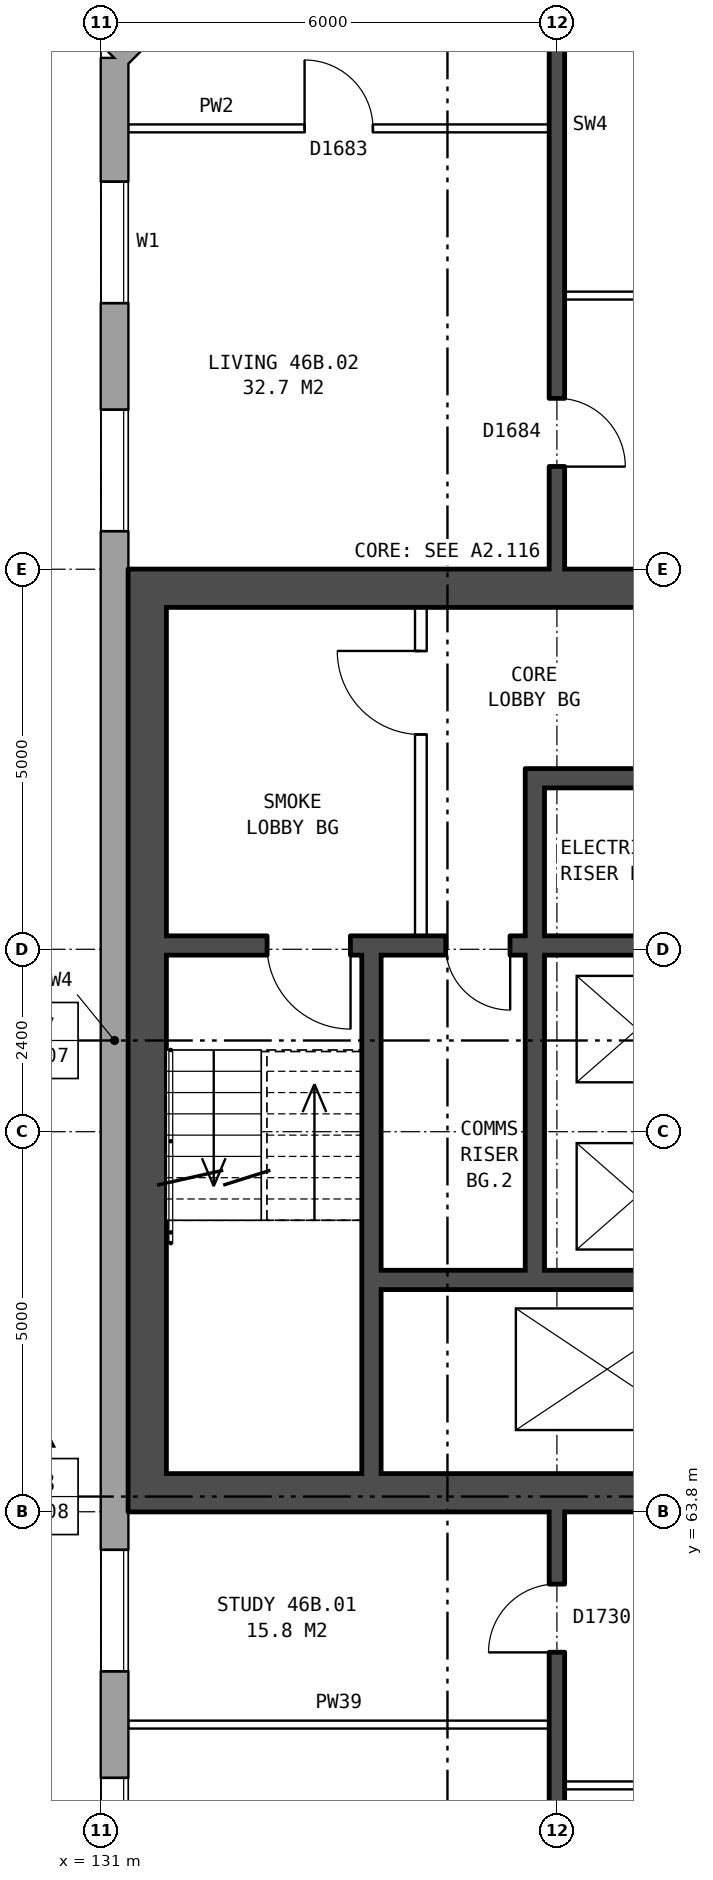
"""IFC4 building model, lengths in metres.
Left out: names, types, materials, properties, quantities, classifications, styles, units other than length and angle.
Written with IfcOpenShell. Run it as: python <this file> out.ifc"""

import sys

from ifc_helpers import new_model, si_unit, direction, frame, frame_2d, origin, place, context, subcontext, project, spatial, rectangle, extrude, element, fill, save


model = new_model("IFC4")
c1 = context("Model", 3, precision=1e-05, world=origin(), true_north=direction((0.0, 1.0)))
c2 = subcontext(c1, "Body", "Model", "MODEL_VIEW")
j1 = project(units=[si_unit("LENGTHUNIT", "METRE"), si_unit("PLANEANGLEUNIT", "RADIAN")], contexts=[c1])
p1 = place(None, origin())
s1 = spatial("IfcSite", under=j1, at=p1, CompositionType="ELEMENT")
p2 = place(p1, origin())
s2 = spatial("IfcBuilding", under=s1, at=p2, CompositionType="ELEMENT")
p3 = place(p2, frame((0.0, 0.0, 164.0)))
s3 = spatial("IfcBuildingStorey", under=s2, at=p3, CompositionType="ELEMENT", Elevation=164.0)
p4 = place(p3, frame((134.075, 85.82, 0.0), z_axis=(0.0, 0.0, 1.0), x_axis=(-0.707106781187, -0.707106781187, 0.0)))
e1 = element("IfcWall", 1, at=p4, inside=s3, PredefinedType="STANDARD", context=c2, shape_type="SweptSolid", body=[
    extrude(rectangle(XDim=4.094, YDim=0.36, at=frame_2d((2.047, 0.0))), origin(), (0.0, 0.0, 1.0), 2.85),
])
p5 = place(p4, frame((1.247, 0.0, 0.8)))
e2 = element("IfcOpeningElement", 2, at=p5, cuts=e1, PredefinedType="OPENING", context=c2, shape_type="SweptSolid", body=[
    extrude(rectangle(XDim=1.6, YDim=1.8, at=frame_2d((0.8, 0.9))), frame((0.0, 0.19, 0.0), z_axis=(0.0, -1.0, 0.0), x_axis=(1.0, 0.0, 0.0)), (0.0, 0.0, 1.0), 0.38),
])
p6 = place(p3, frame((131.18, 82.925, 0.0), z_axis=(0.0, 0.0, 1.0), x_axis=(0.0, -1.0, 0.0)))
e3 = element("IfcWall", 3, at=p6, inside=s3, PredefinedType="STANDARD", context=c2, shape_type="SweptSolid", body=[
    extrude(rectangle(XDim=25.851, YDim=0.36, at=frame_2d((12.925, 0.0))), origin(), (0.0, 0.0, 1.0), 2.85),
])
p7 = place(p6, frame((1.625, 0.0, 0.8)))
e4 = element("IfcOpeningElement", 4, at=p7, cuts=e3, PredefinedType="OPENING", context=c2, shape_type="SweptSolid", body=[
    extrude(rectangle(XDim=1.6, YDim=1.8, at=frame_2d((0.8, 0.9))), frame((0.0, 0.19, 0.0), z_axis=(0.0, -1.0, 0.0), x_axis=(1.0, 0.0, 0.0)), (0.0, 0.0, 1.0), 0.38),
])
p8 = place(p6, frame((4.625, 0.0, 0.8)))
e5 = element("IfcOpeningElement", 5, at=p8, cuts=e3, PredefinedType="OPENING", context=c2, shape_type="SweptSolid", body=[
    extrude(rectangle(XDim=1.6, YDim=1.8, at=frame_2d((0.8, 0.9))), frame((0.0, 0.19, 0.0), z_axis=(0.0, -1.0, 0.0), x_axis=(1.0, 0.0, 0.0)), (0.0, 0.0, 1.0), 0.38),
])
p9 = place(p6, frame((19.625, 0.0, 0.8)))
e6 = element("IfcOpeningElement", 6, at=p9, cuts=e3, PredefinedType="OPENING", context=c2, shape_type="SweptSolid", body=[
    extrude(rectangle(XDim=1.6, YDim=1.8, at=frame_2d((0.8, 0.9))), frame((0.0, 0.19, 0.0), z_axis=(0.0, -1.0, 0.0), x_axis=(1.0, 0.0, 0.0)), (0.0, 0.0, 1.0), 0.38),
])
p10 = place(p6, frame((22.625, 0.0, 0.8)))
e7 = element("IfcOpeningElement", 7, at=p10, cuts=e3, PredefinedType="OPENING", context=c2, shape_type="SweptSolid", body=[
    extrude(rectangle(XDim=1.6, YDim=1.8, at=frame_2d((0.8, 0.9))), frame((0.0, 0.19, 0.0), z_axis=(0.0, -1.0, 0.0), x_axis=(1.0, 0.0, 0.0)), (0.0, 0.0, 1.0), 0.38),
])
p11 = place(p3, frame((131.61, 63.8, 0.0), z_axis=(0.0, 0.0, 1.0), x_axis=(0.0, 1.0, 0.0)))
e8 = element("IfcWall", 8, at=p11, inside=s3, PredefinedType="SHEAR", context=c2, shape_type="SweptSolid", body=[
    extrude(rectangle(XDim=12.4, YDim=0.5, at=frame_2d((6.2, 0.0))), origin(), (0.0, 0.0, 1.0), 2.85),
])
for number, where, z_axis, x_axis in (
    (9, (139.26, 64.05, 0.0), (0.0, 0.0, 1.0), (-1.0, 0.0, 0.0)),
    (10, (139.26, 75.95, 0.0), (0.0, 0.0, 1.0), (-1.0, 0.0, 0.0)),
):
    element("IfcWall", number, at=place(p3, frame(where, z_axis=z_axis, x_axis=x_axis)), inside=s3, PredefinedType="SHEAR", context=c2, shape_type="SweptSolid", body=[
        extrude(rectangle(XDim=7.4, YDim=0.5, at=frame_2d((3.7, 0.0))), origin(), (0.0, 0.0, 1.0), 2.85),
    ])
p12 = place(p3, frame((139.26, 66.85, 0.0), z_axis=(0.0, 0.0, 1.0), x_axis=(-1.0, 0.0, 0.0)))
e11 = element("IfcWall", 11, at=p12, inside=s3, PredefinedType="SHEAR", context=c2, shape_type="SweptSolid", body=[
    extrude(rectangle(XDim=4.575, YDim=0.25, at=frame_2d((2.288, 0.0))), origin(), (0.0, 0.0, 1.0), 2.85),
])
p13 = place(p3, frame((139.26, 71.25, 0.0), z_axis=(0.0, 0.0, 1.0), x_axis=(-1.0, 0.0, 0.0)))
e12 = element("IfcWall", 12, at=p13, inside=s3, PredefinedType="SHEAR", context=c2, shape_type="SweptSolid", body=[
    extrude(rectangle(XDim=7.4, YDim=0.25, at=frame_2d((3.7, 0.0))), origin(), (0.0, 0.0, 1.0), 2.85),
])
p14 = place(p13, frame((4.975, 0.0, 0.0)))
e13 = element("IfcOpeningElement", 13, at=p14, cuts=e12, PredefinedType="OPENING", context=c2, shape_type="SweptSolid", body=[
    extrude(rectangle(XDim=1.1, YDim=2.1, at=frame_2d((0.55, 1.05))), frame((0.0, 0.135, 0.0), z_axis=(0.0, -1.0, 0.0), x_axis=(1.0, 0.0, 0.0)), (0.0, 0.0, 1.0), 0.27),
])
p15 = place(p13, frame((2.875, 0.0, 0.0)))
e14 = element("IfcOpeningElement", 14, at=p15, cuts=e12, PredefinedType="OPENING", context=c2, shape_type="SweptSolid", body=[
    extrude(rectangle(XDim=0.85, YDim=2.1, at=frame_2d((0.425, 1.05))), frame((0.0, 0.135, 0.0), z_axis=(0.0, -1.0, 0.0), x_axis=(1.0, 0.0, 0.0)), (0.0, 0.0, 1.0), 0.27),
])
p16 = place(p3, frame((139.26, 73.45, 0.0), z_axis=(0.0, 0.0, 1.0), x_axis=(-1.0, 0.0, 0.0)))
e15 = element("IfcWall", 15, at=p16, inside=s3, PredefinedType="SHEAR", context=c2, shape_type="SweptSolid", body=[
    extrude(rectangle(XDim=2.425, YDim=0.25, at=frame_2d((1.212, 0.0))), origin(), (0.0, 0.0, 1.0), 2.85),
])
p17 = place(p3, frame((136.71, 66.975, 0.0), z_axis=(0.0, 0.0, 1.0), x_axis=(0.0, 1.0, 0.0)))
e16 = element("IfcWall", 16, at=p17, inside=s3, PredefinedType="SHEAR", context=c2, shape_type="SweptSolid", body=[
    extrude(rectangle(XDim=4.15, YDim=0.25, at=frame_2d((2.075, 0.0))), origin(), (0.0, 0.0, 1.0), 2.85),
])
p18 = place(p3, frame((136.71, 71.375, 0.0), z_axis=(0.0, 0.0, 1.0), x_axis=(0.0, 1.0, 0.0)))
e17 = element("IfcWall", 17, at=p18, inside=s3, PredefinedType="SHEAR", context=c2, shape_type="SweptSolid", body=[
    extrude(rectangle(XDim=2.2, YDim=0.25, at=frame_2d((1.1, 0.0))), origin(), (0.0, 0.0, 1.0), 2.85),
])
p19 = place(p3, frame((135.21, 71.375, 0.0), z_axis=(0.0, 0.0, 1.0), x_axis=(0.0, 1.0, 0.0)))
e18 = element("IfcWall", 18, at=p19, inside=s3, PredefinedType="PARTITIONING", context=c2, shape_type="SweptSolid", body=[
    extrude(rectangle(XDim=4.325, YDim=0.15, at=frame_2d((2.163, 0.0))), origin(), (0.0, 0.0, 1.0), 2.85),
])
p20 = place(p19, frame((2.65, 0.0, 0.0)))
e19 = element("IfcOpeningElement", 19, at=p20, cuts=e18, PredefinedType="OPENING", context=c2, shape_type="SweptSolid", body=[
    extrude(rectangle(XDim=1.1, YDim=2.1, at=frame_2d((0.55, 1.05))), frame((0.0, 0.085, 0.0), z_axis=(0.0, -1.0, 0.0), x_axis=(1.0, 0.0, 0.0)), (0.0, 0.0, 1.0), 0.17),
])
p21 = place(p3, frame((134.56, 64.3, 0.0), z_axis=(0.0, 0.0, 1.0), x_axis=(0.0, 1.0, 0.0)))
e20 = element("IfcWall", 20, at=p21, inside=s3, PredefinedType="SHEAR", context=c2, shape_type="SweptSolid", body=[
    extrude(rectangle(XDim=6.825, YDim=0.25, at=frame_2d((3.413, 0.0))), origin(), (0.0, 0.0, 1.0), 2.85),
])
p22 = place(p3, frame((137.1, 60.2, 0.0), z_axis=(0.0, 0.0, 1.0), x_axis=(1.0, 0.0, 0.0)))
e21 = element("IfcWall", 21, at=p22, inside=s3, PredefinedType="PARTITIONING", context=c2, shape_type="SweptSolid", body=[
    extrude(rectangle(XDim=5.8, YDim=0.1, at=frame_2d((2.9, 0.0))), origin(), (0.0, 0.0, 1.0), 2.85),
])
p23 = place(p22, frame((1.3, 0.0, 0.0)))
e22 = element("IfcOpeningElement", 22, at=p23, cuts=e21, PredefinedType="OPENING", context=c2, shape_type="SweptSolid", body=[
    extrude(rectangle(XDim=0.9, YDim=2.1, at=frame_2d((0.45, 1.05))), frame((0.0, 0.06, 0.0), z_axis=(0.0, -1.0, 0.0), x_axis=(1.0, 0.0, 0.0)), (0.0, 0.0, 1.0), 0.12),
])
p24 = place(p22, frame((4.2, 0.0, 0.0)))
e23 = element("IfcOpeningElement", 23, at=p24, cuts=e21, PredefinedType="OPENING", context=c2, shape_type="SweptSolid", body=[
    extrude(rectangle(XDim=0.9, YDim=2.1, at=frame_2d((0.45, 1.05))), frame((0.0, 0.06, 0.0), z_axis=(0.0, -1.0, 0.0), x_axis=(1.0, 0.0, 0.0)), (0.0, 0.0, 1.0), 0.12),
])
p25 = place(p3, frame((131.36, 61.0, 0.0), z_axis=(0.0, 0.0, 1.0), x_axis=(1.0, 0.0, 0.0)))
e24 = element("IfcWall", 24, at=p25, inside=s3, PredefinedType="PARTITIONING", context=c2, shape_type="SweptSolid", body=[
    extrude(rectangle(XDim=5.54, YDim=0.1, at=frame_2d((2.77, 0.0))), origin(), (0.0, 0.0, 1.0), 2.85),
])
p26 = place(p3, frame((137.1, 79.8, 0.0), z_axis=(0.0, 0.0, 1.0), x_axis=(1.0, 0.0, 0.0)))
e25 = element("IfcWall", 25, at=p26, inside=s3, PredefinedType="PARTITIONING", context=c2, shape_type="SweptSolid", body=[
    extrude(rectangle(XDim=5.8, YDim=0.1, at=frame_2d((2.9, 0.0))), origin(), (0.0, 0.0, 1.0), 2.85),
])
p27 = place(p26, frame((1.3, 0.0, 0.0)))
e26 = element("IfcOpeningElement", 26, at=p27, cuts=e25, PredefinedType="OPENING", context=c2, shape_type="SweptSolid", body=[
    extrude(rectangle(XDim=0.9, YDim=2.1, at=frame_2d((0.45, 1.05))), frame((0.0, 0.06, 0.0), z_axis=(0.0, -1.0, 0.0), x_axis=(1.0, 0.0, 0.0)), (0.0, 0.0, 1.0), 0.12),
])
p28 = place(p26, frame((4.2, 0.0, 0.0)))
e27 = element("IfcOpeningElement", 27, at=p28, cuts=e25, PredefinedType="OPENING", context=c2, shape_type="SweptSolid", body=[
    extrude(rectangle(XDim=0.9, YDim=2.1, at=frame_2d((0.45, 1.05))), frame((0.0, 0.06, 0.0), z_axis=(0.0, -1.0, 0.0), x_axis=(1.0, 0.0, 0.0)), (0.0, 0.0, 1.0), 0.12),
])
p29 = place(p3, frame((131.36, 82.0, 0.0), z_axis=(0.0, 0.0, 1.0), x_axis=(1.0, 0.0, 0.0)))
e28 = element("IfcWall", 28, at=p29, inside=s3, PredefinedType="PARTITIONING", context=c2, shape_type="SweptSolid", body=[
    extrude(rectangle(XDim=5.54, YDim=0.1, at=frame_2d((2.77, 0.0))), origin(), (0.0, 0.0, 1.0), 2.85),
])
p30 = place(p29, frame((2.32, 0.0, 0.0)))
e29 = element("IfcOpeningElement", 29, at=p30, cuts=e28, PredefinedType="OPENING", context=c2, shape_type="SweptSolid", body=[
    extrude(rectangle(XDim=0.9, YDim=2.1, at=frame_2d((0.45, 1.05))), frame((0.0, 0.06, 0.0), z_axis=(0.0, -1.0, 0.0), x_axis=(1.0, 0.0, 0.0)), (0.0, 0.0, 1.0), 0.12),
])
p31 = place(p3, frame((137.0, 54.36, 0.0), z_axis=(0.0, 0.0, 1.0), x_axis=(0.0, 1.0, 0.0)))
e30 = element("IfcWall", 30, at=p31, inside=s3, PredefinedType="SOLIDWALL", context=c2, shape_type="SweptSolid", body=[
    extrude(rectangle(XDim=9.44, YDim=0.2, at=frame_2d((4.72, 0.0))), origin(), (0.0, 0.0, 1.0), 2.85),
])
p32 = place(p31, frame((2.47, 0.0, 0.0)))
e31 = element("IfcOpeningElement", 31, at=p32, cuts=e30, PredefinedType="OPENING", context=c2, shape_type="SweptSolid", body=[
    extrude(rectangle(XDim=0.9, YDim=2.1, at=frame_2d((0.45, 1.05))), frame((0.0, 0.11, 0.0), z_axis=(0.0, -1.0, 0.0), x_axis=(1.0, 0.0, 0.0)), (0.0, 0.0, 1.0), 0.22),
])
p33 = place(p31, frame((7.59, 0.0, 0.0)))
e32 = element("IfcOpeningElement", 32, at=p33, cuts=e30, PredefinedType="OPENING", context=c2, shape_type="SweptSolid", body=[
    extrude(rectangle(XDim=0.9, YDim=2.1, at=frame_2d((0.45, 1.05))), frame((0.0, 0.11, 0.0), z_axis=(0.0, -1.0, 0.0), x_axis=(1.0, 0.0, 0.0)), (0.0, 0.0, 1.0), 0.22),
])
p34 = place(p3, frame((137.0, 76.2, 0.0), z_axis=(0.0, 0.0, 1.0), x_axis=(0.0, 1.0, 0.0)))
e33 = element("IfcWall", 33, at=p34, inside=s3, PredefinedType="SOLIDWALL", context=c2, shape_type="SweptSolid", body=[
    extrude(rectangle(XDim=9.44, YDim=0.2, at=frame_2d((4.72, 0.0))), origin(), (0.0, 0.0, 1.0), 2.85),
])
p35 = place(p34, frame((1.35, 0.0, 0.0)))
e34 = element("IfcOpeningElement", 34, at=p35, cuts=e33, PredefinedType="OPENING", context=c2, shape_type="SweptSolid", body=[
    extrude(rectangle(XDim=0.9, YDim=2.1, at=frame_2d((0.45, 1.05))), frame((0.0, 0.11, 0.0), z_axis=(0.0, -1.0, 0.0), x_axis=(1.0, 0.0, 0.0)), (0.0, 0.0, 1.0), 0.22),
])
p36 = place(p7, origin())
e35 = element("IfcWindow", 35, at=p36, inside=s3, PartitioningType="SINGLE_PANEL", PredefinedType="WINDOW", context=c2, shape_type="SweptSolid", body=[
    extrude(rectangle(XDim=1.6, YDim=1.8, at=frame_2d((0.8, 0.9))), frame((0.0, 0.15, 0.0), z_axis=(0.0, -1.0, 0.0), x_axis=(1.0, 0.0, 0.0)), (0.0, 0.0, 1.0), 0.06),
])
fill(e4, e35)
p37 = place(p8, origin())
e36 = element("IfcWindow", 36, at=p37, inside=s3, PartitioningType="SINGLE_PANEL", PredefinedType="WINDOW", context=c2, shape_type="SweptSolid", body=[
    extrude(rectangle(XDim=1.6, YDim=1.8, at=frame_2d((0.8, 0.9))), frame((0.0, 0.15, 0.0), z_axis=(0.0, -1.0, 0.0), x_axis=(1.0, 0.0, 0.0)), (0.0, 0.0, 1.0), 0.06),
])
fill(e5, e36)
p38 = place(p9, origin())
e37 = element("IfcWindow", 37, at=p38, inside=s3, PartitioningType="SINGLE_PANEL", PredefinedType="WINDOW", context=c2, shape_type="SweptSolid", body=[
    extrude(rectangle(XDim=1.6, YDim=1.8, at=frame_2d((0.8, 0.9))), frame((0.0, 0.15, 0.0), z_axis=(0.0, -1.0, 0.0), x_axis=(1.0, 0.0, 0.0)), (0.0, 0.0, 1.0), 0.06),
])
fill(e6, e37)
p39 = place(p10, origin())
e38 = element("IfcWindow", 38, at=p39, inside=s3, PartitioningType="SINGLE_PANEL", PredefinedType="WINDOW", context=c2, shape_type="SweptSolid", body=[
    extrude(rectangle(XDim=1.6, YDim=1.8, at=frame_2d((0.8, 0.9))), frame((0.0, 0.15, 0.0), z_axis=(0.0, -1.0, 0.0), x_axis=(1.0, 0.0, 0.0)), (0.0, 0.0, 1.0), 0.06),
])
fill(e7, e38)
p40 = place(p20, origin())
e39 = element("IfcDoor", 39, at=p40, inside=s3, OperationType="SINGLE_SWING_RIGHT", PredefinedType="DOOR", context=c2, shape_type="SweptSolid", body=[
    extrude(rectangle(XDim=1.1, YDim=2.1, at=frame_2d((0.55, 1.05))), frame((0.0, 0.025, 0.0), z_axis=(0.0, -1.0, 0.0), x_axis=(1.0, 0.0, 0.0)), (0.0, 0.0, 1.0), 0.05),
])
fill(e19, e39)
p41 = place(p14, origin())
e40 = element("IfcDoor", 40, at=p41, inside=s3, OperationType="SINGLE_SWING_LEFT", PredefinedType="DOOR", context=c2, shape_type="SweptSolid", body=[
    extrude(rectangle(XDim=1.1, YDim=2.1, at=frame_2d((0.55, 1.05))), frame((0.0, 0.025, 0.0), z_axis=(0.0, -1.0, 0.0), x_axis=(1.0, 0.0, 0.0)), (0.0, 0.0, 1.0), 0.05),
])
fill(e13, e40)
p42 = place(p15, origin())
e41 = element("IfcDoor", 41, at=p42, inside=s3, OperationType="SINGLE_SWING_LEFT", PredefinedType="DOOR", context=c2, shape_type="SweptSolid", body=[
    extrude(rectangle(XDim=0.85, YDim=2.1, at=frame_2d((0.425, 1.05))), frame((0.0, 0.025, 0.0), z_axis=(0.0, -1.0, 0.0), x_axis=(1.0, 0.0, 0.0)), (0.0, 0.0, 1.0), 0.05),
])
fill(e14, e41)
p43 = place(p33, origin())
e42 = element("IfcDoor", 42, at=p43, inside=s3, OperationType="SINGLE_SWING_LEFT", PredefinedType="DOOR", context=c2, shape_type="SweptSolid", body=[
    extrude(rectangle(XDim=0.9, YDim=2.1, at=frame_2d((0.45, 1.05))), frame((0.0, 0.025, 0.0), z_axis=(0.0, -1.0, 0.0), x_axis=(1.0, 0.0, 0.0)), (0.0, 0.0, 1.0), 0.05),
])
fill(e32, e42)
p44 = place(p30, origin())
e43 = element("IfcDoor", 43, at=p44, inside=s3, OperationType="SINGLE_SWING_LEFT", PredefinedType="DOOR", context=c2, shape_type="SweptSolid", body=[
    extrude(rectangle(XDim=0.9, YDim=2.1, at=frame_2d((0.45, 1.05))), frame((0.0, 0.025, 0.0), z_axis=(0.0, -1.0, 0.0), x_axis=(1.0, 0.0, 0.0)), (0.0, 0.0, 1.0), 0.05),
])
fill(e29, e43)
p45 = place(p35, frame((0.9, 0.0, 0.0), z_axis=(0.0, 0.0, 1.0), x_axis=(-1.0, 0.0, 0.0)))
e44 = element("IfcDoor", 44, at=p45, inside=s3, OperationType="SINGLE_SWING_RIGHT", PredefinedType="DOOR", context=c2, shape_type="SweptSolid", body=[
    extrude(rectangle(XDim=0.9, YDim=2.1, at=frame_2d((0.45, 1.05))), frame((0.0, 0.025, 0.0), z_axis=(0.0, -1.0, 0.0), x_axis=(1.0, 0.0, 0.0)), (0.0, 0.0, 1.0), 0.05),
])
fill(e34, e44)
save(model, sys.argv[1])
